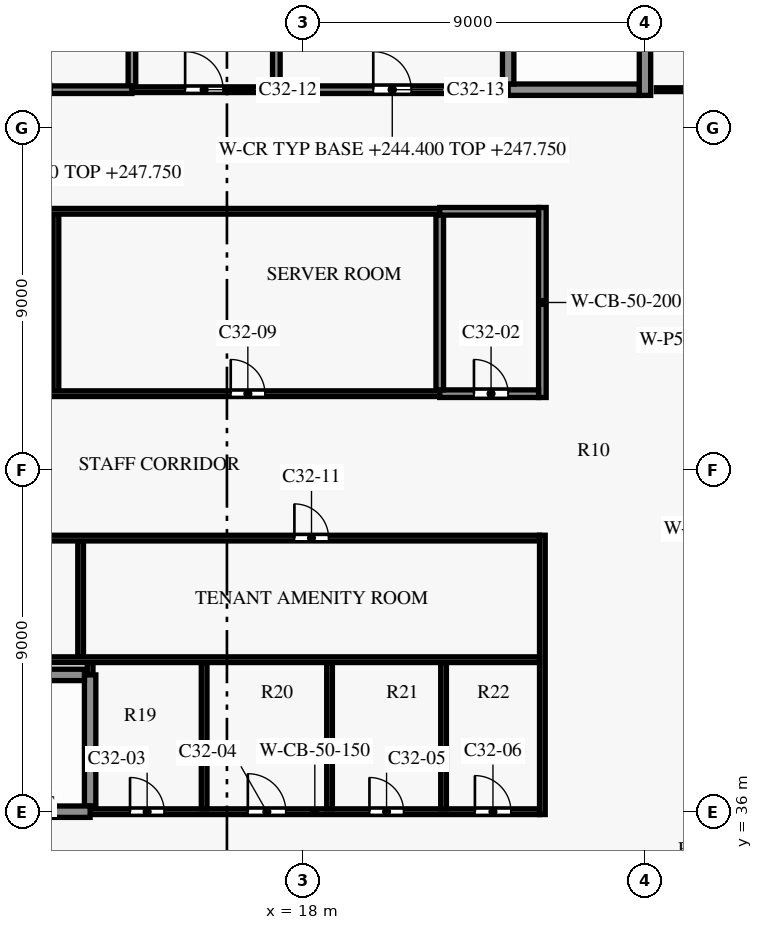
"""IFC4 building model, lengths in metres.
Left out: names, types, materials, properties, quantities, classifications, styles, units other than length and angle.
Written with IfcOpenShell. Run it as: python <this file> out.ifc"""

import sys

from ifc_helpers import new_model, si_unit, direction, frame, frame_2d, origin, place, context, subcontext, project, spatial, rectangle, extrude, element, fill, save


model = new_model("IFC4")
c1 = context("Model", 3, precision=1e-05, world=origin(), true_north=direction((0.0, 1.0)))
c2 = subcontext(c1, "Body", "Model", "MODEL_VIEW")
j1 = project(units=[si_unit("LENGTHUNIT", "METRE"), si_unit("PLANEANGLEUNIT", "RADIAN")], contexts=[c1])
p1 = place(None, origin())
s1 = spatial("IfcSite", under=j1, at=p1, CompositionType="ELEMENT")
p2 = place(p1, origin())
s2 = spatial("IfcBuilding", under=s1, at=p2, CompositionType="ELEMENT")
p3 = place(p2, frame((0.0, 0.0, 244.4)))
s3 = spatial("IfcBuildingStorey", under=s2, at=p3, CompositionType="ELEMENT", Elevation=244.4)
p4 = place(p3, frame((12.4, 36.0, 0.0), z_axis=(0.0, 0.0, 1.0), x_axis=(1.0, 0.0, 0.0)))
e1 = element("IfcWall", 1, at=p4, inside=s3, PredefinedType="SHEAR", context=c2, shape_type="SweptSolid", body=[
    extrude(rectangle(XDim=11.825, YDim=0.15, at=frame_2d((5.913, 0.0))), origin(), (0.0, 0.0, 1.0), 3.5),
])
p5 = place(p4, frame((1.05, 0.0, 0.0)))
e2 = element("IfcOpeningElement", 2, at=p5, cuts=e1, PredefinedType="OPENING", context=c2, shape_type="SweptSolid", body=[
    extrude(rectangle(XDim=0.9, YDim=2.1, at=frame_2d((0.45, 1.05))), frame((0.0, 0.085, 0.0), z_axis=(0.0, -1.0, 0.0), x_axis=(1.0, 0.0, 0.0)), (0.0, 0.0, 1.0), 0.17),
])
p6 = place(p4, frame((4.15, 0.0, 0.0)))
e3 = element("IfcOpeningElement", 3, at=p6, cuts=e1, PredefinedType="OPENING", context=c2, shape_type="SweptSolid", body=[
    extrude(rectangle(XDim=1.0, YDim=2.1, at=frame_2d((0.5, 1.05))), frame((0.0, 0.085, 0.0), z_axis=(0.0, -1.0, 0.0), x_axis=(1.0, 0.0, 0.0)), (0.0, 0.0, 1.0), 0.17),
])
p7 = place(p4, frame((7.35, 0.0, 0.0)))
e4 = element("IfcOpeningElement", 4, at=p7, cuts=e1, PredefinedType="OPENING", context=c2, shape_type="SweptSolid", body=[
    extrude(rectangle(XDim=0.9, YDim=2.1, at=frame_2d((0.45, 1.05))), frame((0.0, 0.085, 0.0), z_axis=(0.0, -1.0, 0.0), x_axis=(1.0, 0.0, 0.0)), (0.0, 0.0, 1.0), 0.17),
])
p8 = place(p4, frame((10.125, 0.0, 0.0)))
e5 = element("IfcOpeningElement", 5, at=p8, cuts=e1, PredefinedType="OPENING", context=c2, shape_type="SweptSolid", body=[
    extrude(rectangle(XDim=0.95, YDim=2.1, at=frame_2d((0.475, 1.05))), frame((0.0, 0.085, 0.0), z_axis=(0.0, -1.0, 0.0), x_axis=(1.0, 0.0, 0.0)), (0.0, 0.0, 1.0), 0.17),
])
p9 = place(p3, frame((4.4, 36.0, 0.0), z_axis=(0.0, 0.0, 1.0), x_axis=(1.0, 0.0, 0.0)))
e6 = element("IfcWall", 6, at=p9, inside=s3, PredefinedType="SHEAR", context=c2, shape_type="SweptSolid", body=[
    extrude(rectangle(XDim=8.0, YDim=0.3, at=frame_2d((4.0, 0.0))), origin(), (0.0, 0.0, 1.0), 3.5),
])
p10 = place(p9, frame((0.3, 0.0, 0.0)))
e7 = element("IfcOpeningElement", 7, at=p10, cuts=e6, PredefinedType="OPENING", context=c2, shape_type="SweptSolid", body=[
    extrude(rectangle(XDim=1.5, YDim=2.2, at=frame_2d((0.75, 1.1))), frame((0.0, 0.16, 0.0), z_axis=(0.0, -1.0, 0.0), x_axis=(1.0, 0.0, 0.0)), (0.0, 0.0, 1.0), 0.32),
])
p11 = place(p3, frame((4.55, 39.6, 0.0), z_axis=(0.0, 0.0, 1.0), x_axis=(1.0, 0.0, 0.0)))
e8 = element("IfcWall", 8, at=p11, inside=s3, PredefinedType="SHEAR", context=c2, shape_type="SweptSolid", body=[
    extrude(rectangle(XDim=7.7, YDim=0.3, at=frame_2d((3.85, 0.0))), origin(), (0.0, 0.0, 1.0), 3.5),
])
p12 = place(p3, frame((8.1, 40.0, 0.0), z_axis=(0.0, 0.0, 1.0), x_axis=(1.0, 0.0, 0.0)))
e9 = element("IfcWall", 9, at=p12, inside=s3, PredefinedType="PARTITIONING", context=c2, shape_type="SweptSolid", body=[
    extrude(rectangle(XDim=16.125, YDim=0.15, at=frame_2d((8.062, 0.0))), origin(), (0.0, 0.0, 1.0), 3.35),
])
p13 = place(p3, frame((8.1, 43.2, 0.0), z_axis=(0.0, 0.0, 1.0), x_axis=(1.0, 0.0, 0.0)))
e10 = element("IfcWall", 10, at=p13, inside=s3, PredefinedType="PARTITIONING", context=c2, shape_type="SweptSolid", body=[
    extrude(rectangle(XDim=16.125, YDim=0.15, at=frame_2d((8.062, 0.0))), origin(), (0.0, 0.0, 1.0), 3.35),
])
p14 = place(p13, frame((1.575, 0.0, 0.0)))
e11 = element("IfcOpeningElement", 11, at=p14, cuts=e10, PredefinedType="OPENING", context=c2, shape_type="SweptSolid", body=[
    extrude(rectangle(XDim=0.9, YDim=2.1, at=frame_2d((0.45, 1.05))), frame((0.0, 0.085, 0.0), z_axis=(0.0, -1.0, 0.0), x_axis=(1.0, 0.0, 0.0)), (0.0, 0.0, 1.0), 0.17),
])
p15 = place(p13, frame((9.675, 0.0, 0.0)))
e12 = element("IfcOpeningElement", 12, at=p15, cuts=e10, PredefinedType="OPENING", context=c2, shape_type="SweptSolid", body=[
    extrude(rectangle(XDim=0.9, YDim=2.1, at=frame_2d((0.45, 1.05))), frame((0.0, 0.085, 0.0), z_axis=(0.0, -1.0, 0.0), x_axis=(1.0, 0.0, 0.0)), (0.0, 0.0, 1.0), 0.17),
])
p16 = place(p3, frame((8.1, 47.0, 0.0), z_axis=(0.0, 0.0, 1.0), x_axis=(1.0, 0.0, 0.0)))
e13 = element("IfcWall", 13, at=p16, inside=s3, PredefinedType="PARTITIONING", context=c2, shape_type="SweptSolid", body=[
    extrude(rectangle(XDim=13.5, YDim=0.15, at=frame_2d((6.75, 0.0))), origin(), (0.0, 0.0, 1.0), 3.35),
])
p17 = place(p16, frame((1.25, 0.0, 0.0)))
e14 = element("IfcOpeningElement", 14, at=p17, cuts=e13, PredefinedType="OPENING", context=c2, shape_type="SweptSolid", body=[
    extrude(rectangle(XDim=0.9, YDim=2.1, at=frame_2d((0.45, 1.05))), frame((0.0, 0.085, 0.0), z_axis=(0.0, -1.0, 0.0), x_axis=(1.0, 0.0, 0.0)), (0.0, 0.0, 1.0), 0.17),
])
p18 = place(p16, frame((8.0, 0.0, 0.0)))
e15 = element("IfcOpeningElement", 15, at=p18, cuts=e13, PredefinedType="OPENING", context=c2, shape_type="SweptSolid", body=[
    extrude(rectangle(XDim=0.9, YDim=2.1, at=frame_2d((0.45, 1.05))), frame((0.0, 0.085, 0.0), z_axis=(0.0, -1.0, 0.0), x_axis=(1.0, 0.0, 0.0)), (0.0, 0.0, 1.0), 0.17),
])
p19 = place(p3, frame((21.6, 47.0, 0.0), z_axis=(0.0, 0.0, 1.0), x_axis=(1.0, 0.0, 0.0)))
e16 = element("IfcWall", 16, at=p19, inside=s3, PredefinedType="PARTITIONING", context=c2, shape_type="SweptSolid", body=[
    extrude(rectangle(XDim=2.6, YDim=0.2, at=frame_2d((1.3, 0.0))), origin(), (0.0, 0.0, 1.0), 3.35),
])
p20 = place(p19, frame((0.9, 0.0, 0.0)))
e17 = element("IfcOpeningElement", 17, at=p20, cuts=e16, PredefinedType="OPENING", context=c2, shape_type="SweptSolid", body=[
    extrude(rectangle(XDim=0.9, YDim=2.1, at=frame_2d((0.45, 1.05))), frame((0.0, 0.11, 0.0), z_axis=(0.0, -1.0, 0.0), x_axis=(1.0, 0.0, 0.0)), (0.0, 0.0, 1.0), 0.22),
])
p21 = place(p3, frame((8.225, 51.8, 0.0), z_axis=(0.0, 0.0, 1.0), x_axis=(1.0, 0.0, 0.0)))
e18 = element("IfcWall", 18, at=p21, inside=s3, PredefinedType="PARTITIONING", context=c2, shape_type="SweptSolid", body=[
    extrude(rectangle(XDim=13.375, YDim=0.15, at=frame_2d((6.688, 0.0))), origin(), (0.0, 0.0, 1.0), 3.35),
])
p22 = place(p3, frame((21.6, 51.8, 0.0), z_axis=(0.0, 0.0, 1.0), x_axis=(1.0, 0.0, 0.0)))
e19 = element("IfcWall", 19, at=p22, inside=s3, PredefinedType="PARTITIONING", context=c2, shape_type="SweptSolid", body=[
    extrude(rectangle(XDim=2.6, YDim=0.2, at=frame_2d((1.3, 0.0))), origin(), (0.0, 0.0, 1.0), 3.35),
])
p23 = place(p3, frame((8.1, 55.0, 0.0), z_axis=(0.0, 0.0, 1.0), x_axis=(1.0, 0.0, 0.0)))
e20 = element("IfcWall", 20, at=p23, inside=s3, PredefinedType="PARTITIONING", context=c2, shape_type="SweptSolid", body=[
    extrude(rectangle(XDim=5.4, YDim=0.2, at=frame_2d((2.7, 0.0))), origin(), (0.0, 0.0, 1.0), 3.35),
])
p24 = place(p23, frame((2.1, 0.0, 0.0)))
e21 = element("IfcOpeningElement", 21, at=p24, cuts=e20, PredefinedType="OPENING", context=c2, shape_type="SweptSolid", body=[
    extrude(rectangle(XDim=1.2, YDim=2.2, at=frame_2d((0.6, 1.1))), frame((0.0, 0.11, 0.0), z_axis=(0.0, -1.0, 0.0), x_axis=(1.0, 0.0, 0.0)), (0.0, 0.0, 1.0), 0.22),
])
p25 = place(p3, frame((13.5, 55.0, 0.0), z_axis=(0.0, 0.0, 1.0), x_axis=(1.0, 0.0, 0.0)))
e22 = element("IfcWall", 22, at=p25, inside=s3, PredefinedType="PARTITIONING", context=c2, shape_type="SweptSolid", body=[
    extrude(rectangle(XDim=3.8, YDim=0.15, at=frame_2d((1.9, 0.0))), origin(), (0.0, 0.0, 1.0), 3.35),
])
p26 = place(p25, frame((1.4, 0.0, 0.0)))
e23 = element("IfcOpeningElement", 23, at=p26, cuts=e22, PredefinedType="OPENING", context=c2, shape_type="SweptSolid", body=[
    extrude(rectangle(XDim=1.0, YDim=2.1, at=frame_2d((0.5, 1.05))), frame((0.0, 0.085, 0.0), z_axis=(0.0, -1.0, 0.0), x_axis=(1.0, 0.0, 0.0)), (0.0, 0.0, 1.0), 0.17),
])
p27 = place(p3, frame((17.3, 55.0, 0.0), z_axis=(0.0, 0.0, 1.0), x_axis=(1.0, 0.0, 0.0)))
e24 = element("IfcWall", 24, at=p27, inside=s3, PredefinedType="PARTITIONING", context=c2, shape_type="SweptSolid", body=[
    extrude(rectangle(XDim=6.1, YDim=0.2, at=frame_2d((3.05, 0.0))), origin(), (0.0, 0.0, 1.0), 3.35),
])
p28 = place(p27, frame((2.55, 0.0, 0.0)))
e25 = element("IfcOpeningElement", 25, at=p28, cuts=e24, PredefinedType="OPENING", context=c2, shape_type="SweptSolid", body=[
    extrude(rectangle(XDim=1.0, YDim=2.1, at=frame_2d((0.5, 1.05))), frame((0.0, 0.11, 0.0), z_axis=(0.0, -1.0, 0.0), x_axis=(1.0, 0.0, 0.0)), (0.0, 0.0, 1.0), 0.22),
])
p29 = place(p3, frame((23.4, 55.0, 0.0), z_axis=(0.0, 0.0, 1.0), x_axis=(1.0, 0.0, 0.0)))
e26 = element("IfcWall", 26, at=p29, inside=s3, PredefinedType="SHEAR", context=c2, shape_type="SweptSolid", body=[
    extrude(rectangle(XDim=3.45, YDim=0.3, at=frame_2d((1.725, 0.0))), origin(), (0.0, 0.0, 1.0), 3.5),
])
p30 = place(p3, frame((11.5, 47.075, 0.0), z_axis=(0.0, 0.0, 1.0), x_axis=(0.0, 1.0, 0.0)))
e27 = element("IfcWall", 27, at=p30, inside=s3, PredefinedType="PARTITIONING", context=c2, shape_type="SweptSolid", body=[
    extrude(rectangle(XDim=4.65, YDim=0.15, at=frame_2d((2.325, 0.0))), origin(), (0.0, 0.0, 1.0), 3.35),
])
p31 = place(p3, frame((12.15, 40.075, 0.0), z_axis=(0.0, 0.0, 1.0), x_axis=(0.0, 1.0, 0.0)))
e28 = element("IfcWall", 28, at=p31, inside=s3, PredefinedType="PARTITIONING", context=c2, shape_type="SweptSolid", body=[
    extrude(rectangle(XDim=3.05, YDim=0.15, at=frame_2d((1.525, 0.0))), origin(), (0.0, 0.0, 1.0), 3.35),
])
p32 = place(p3, frame((12.4, 39.6, 0.0), z_axis=(0.0, 0.0, 1.0), x_axis=(0.0, 1.0, 0.0)))
e29 = element("IfcWall", 29, at=p32, inside=s3, PredefinedType="PARTITIONING", context=c2, shape_type="SweptSolid", body=[
    extrude(rectangle(XDim=0.325, YDim=0.15, at=frame_2d((0.163, 0.0))), origin(), (0.0, 0.0, 1.0), 3.35),
])
p33 = place(p3, frame((12.4, 36.15, 0.0), z_axis=(0.0, 0.0, 1.0), x_axis=(0.0, 1.0, 0.0)))
e30 = element("IfcWall", 30, at=p33, inside=s3, PredefinedType="SHEAR", context=c2, shape_type="SweptSolid", body=[
    extrude(rectangle(XDim=3.45, YDim=0.3, at=frame_2d((1.725, 0.0))), origin(), (0.0, 0.0, 1.0), 3.5),
])
p34 = place(p3, frame((13.5, 55.1, 0.0), z_axis=(0.0, 0.0, 1.0), x_axis=(0.0, 1.0, 0.0)))
e31 = element("IfcWall", 31, at=p34, inside=s3, PredefinedType="PARTITIONING", context=c2, shape_type="SweptSolid", body=[
    extrude(rectangle(XDim=3.9, YDim=0.2, at=frame_2d((1.95, 0.0))), origin(), (0.0, 0.0, 1.0), 3.35),
])
p35 = place(p3, frame((15.4, 36.075, 0.0), z_axis=(0.0, 0.0, 1.0), x_axis=(0.0, 1.0, 0.0)))
e32 = element("IfcWall", 32, at=p35, inside=s3, PredefinedType="PARTITIONING", context=c2, shape_type="SweptSolid", body=[
    extrude(rectangle(XDim=3.85, YDim=0.15, at=frame_2d((1.925, 0.0))), origin(), (0.0, 0.0, 1.0), 3.35),
])
p36 = place(p3, frame((17.3, 55.1, 0.0), z_axis=(0.0, 0.0, 1.0), x_axis=(0.0, 1.0, 0.0)))
e33 = element("IfcWall", 33, at=p36, inside=s3, PredefinedType="PARTITIONING", context=c2, shape_type="SweptSolid", body=[
    extrude(rectangle(XDim=7.05, YDim=0.2, at=frame_2d((3.525, 0.0))), origin(), (0.0, 0.0, 1.0), 3.35),
])
p37 = place(p3, frame((18.7, 36.075, 0.0), z_axis=(0.0, 0.0, 1.0), x_axis=(0.0, 1.0, 0.0)))
e34 = element("IfcWall", 34, at=p37, inside=s3, PredefinedType="PARTITIONING", context=c2, shape_type="SweptSolid", body=[
    extrude(rectangle(XDim=3.85, YDim=0.15, at=frame_2d((1.925, 0.0))), origin(), (0.0, 0.0, 1.0), 3.35),
])
p38 = place(p3, frame((21.6, 47.1, 0.0), z_axis=(0.0, 0.0, 1.0), x_axis=(0.0, 1.0, 0.0)))
e35 = element("IfcWall", 35, at=p38, inside=s3, PredefinedType="PARTITIONING", context=c2, shape_type="SweptSolid", body=[
    extrude(rectangle(XDim=4.6, YDim=0.2, at=frame_2d((2.3, 0.0))), origin(), (0.0, 0.0, 1.0), 3.35),
])
p39 = place(p3, frame((21.7, 36.075, 0.0), z_axis=(0.0, 0.0, 1.0), x_axis=(0.0, 1.0, 0.0)))
e36 = element("IfcWall", 36, at=p39, inside=s3, PredefinedType="PARTITIONING", context=c2, shape_type="SweptSolid", body=[
    extrude(rectangle(XDim=3.85, YDim=0.15, at=frame_2d((1.925, 0.0))), origin(), (0.0, 0.0, 1.0), 3.35),
])
p40 = place(p3, frame((23.4, 55.15, 0.0), z_axis=(0.0, 0.0, 1.0), x_axis=(0.0, 1.0, 0.0)))
e37 = element("IfcWall", 37, at=p40, inside=s3, PredefinedType="SHEAR", context=c2, shape_type="SweptSolid", body=[
    extrude(rectangle(XDim=8.0, YDim=0.3, at=frame_2d((4.0, 0.0))), origin(), (0.0, 0.0, 1.0), 3.5),
])
p41 = place(p3, frame((24.3, 35.925, 0.0), z_axis=(0.0, 0.0, 1.0), x_axis=(0.0, 1.0, 0.0)))
e38 = element("IfcWall", 38, at=p41, inside=s3, PredefinedType="PARTITIONING", context=c2, shape_type="SweptSolid", body=[
    extrude(rectangle(XDim=7.35, YDim=0.15, at=frame_2d((3.675, 0.0))), origin(), (0.0, 0.0, 1.0), 3.35),
])
p42 = place(p3, frame((24.3, 46.9, 0.0), z_axis=(0.0, 0.0, 1.0), x_axis=(0.0, 1.0, 0.0)))
e39 = element("IfcWall", 39, at=p42, inside=s3, PredefinedType="SHEAR", context=c2, shape_type="SweptSolid", body=[
    extrude(rectangle(XDim=5.0, YDim=0.2, at=frame_2d((2.5, 0.0))), origin(), (0.0, 0.0, 1.0), 3.5),
])
p43 = place(p3, frame((27.0, 54.85, 0.0), z_axis=(0.0, 0.0, 1.0), x_axis=(0.0, 1.0, 0.0)))
e40 = element("IfcWall", 40, at=p43, inside=s3, PredefinedType="SHEAR", context=c2, shape_type="SweptSolid", body=[
    extrude(rectangle(XDim=8.55, YDim=0.3, at=frame_2d((4.275, 0.0))), origin(), (0.0, 0.0, 1.0), 3.5),
])
p44 = place(p43, frame((6.55, 0.0, 0.0)))
e41 = element("IfcOpeningElement", 41, at=p44, cuts=e40, PredefinedType="OPENING", context=c2, shape_type="SweptSolid", body=[
    extrude(rectangle(XDim=1.2, YDim=2.2, at=frame_2d((0.6, 1.1))), frame((0.0, 0.16, 0.0), z_axis=(0.0, -1.0, 0.0), x_axis=(1.0, 0.0, 0.0)), (0.0, 0.0, 1.0), 0.32),
])
p45 = place(p3, frame((27.3, 55.0, 0.0), z_axis=(0.0, 0.0, 1.0), x_axis=(1.0, 0.0, 0.0)))
e42 = element("IfcWall", 42, at=p45, inside=s3, PredefinedType="PARTITIONING", context=c2, shape_type="SweptSolid", body=[
    extrude(rectangle(XDim=2.75, YDim=0.1, at=frame_2d((1.375, 0.0))), origin(), (0.0, 0.0, 1.0), 3.33),
])
p46 = place(p24, origin())
e43 = element("IfcDoor", 43, at=p46, inside=s3, OperationType="SINGLE_SWING_RIGHT", PredefinedType="DOOR", context=c2, shape_type="SweptSolid", body=[
    extrude(rectangle(XDim=1.2, YDim=2.2, at=frame_2d((0.6, 1.1))), frame((0.0, 0.025, 0.0), z_axis=(0.0, -1.0, 0.0), x_axis=(1.0, 0.0, 0.0)), (0.0, 0.0, 1.0), 0.05),
])
fill(e21, e43)
p47 = place(p20, origin())
e44 = element("IfcDoor", 44, at=p47, inside=s3, OperationType="SINGLE_SWING_LEFT", PredefinedType="DOOR", context=c2, shape_type="SweptSolid", body=[
    extrude(rectangle(XDim=0.9, YDim=2.1, at=frame_2d((0.45, 1.05))), frame((0.0, 0.025, 0.0), z_axis=(0.0, -1.0, 0.0), x_axis=(1.0, 0.0, 0.0)), (0.0, 0.0, 1.0), 0.05),
])
fill(e17, e44)
p48 = place(p5, origin())
e45 = element("IfcDoor", 45, at=p48, inside=s3, OperationType="SINGLE_SWING_RIGHT", PredefinedType="DOOR", context=c2, shape_type="SweptSolid", body=[
    extrude(rectangle(XDim=0.9, YDim=2.1, at=frame_2d((0.45, 1.05))), frame((0.0, 0.025, 0.0), z_axis=(0.0, -1.0, 0.0), x_axis=(1.0, 0.0, 0.0)), (0.0, 0.0, 1.0), 0.05),
])
fill(e2, e45)
p49 = place(p6, origin())
e46 = element("IfcDoor", 46, at=p49, inside=s3, OperationType="SINGLE_SWING_LEFT", PredefinedType="DOOR", context=c2, shape_type="SweptSolid", body=[
    extrude(rectangle(XDim=1.0, YDim=2.1, at=frame_2d((0.5, 1.05))), frame((0.0, 0.025, 0.0), z_axis=(0.0, -1.0, 0.0), x_axis=(1.0, 0.0, 0.0)), (0.0, 0.0, 1.0), 0.05),
])
fill(e3, e46)
p50 = place(p7, origin())
e47 = element("IfcDoor", 47, at=p50, inside=s3, OperationType="SINGLE_SWING_RIGHT", PredefinedType="DOOR", context=c2, shape_type="SweptSolid", body=[
    extrude(rectangle(XDim=0.9, YDim=2.1, at=frame_2d((0.45, 1.05))), frame((0.0, 0.025, 0.0), z_axis=(0.0, -1.0, 0.0), x_axis=(1.0, 0.0, 0.0)), (0.0, 0.0, 1.0), 0.05),
])
fill(e4, e47)
p51 = place(p8, origin())
e48 = element("IfcDoor", 48, at=p51, inside=s3, OperationType="SINGLE_SWING_LEFT", PredefinedType="DOOR", context=c2, shape_type="SweptSolid", body=[
    extrude(rectangle(XDim=0.95, YDim=2.1, at=frame_2d((0.475, 1.05))), frame((0.0, 0.025, 0.0), z_axis=(0.0, -1.0, 0.0), x_axis=(1.0, 0.0, 0.0)), (0.0, 0.0, 1.0), 0.05),
])
fill(e5, e48)
p52 = place(p18, origin())
e49 = element("IfcDoor", 49, at=p52, inside=s3, OperationType="SINGLE_SWING_RIGHT", PredefinedType="DOOR", context=c2, shape_type="SweptSolid", body=[
    extrude(rectangle(XDim=0.9, YDim=2.1, at=frame_2d((0.45, 1.05))), frame((0.0, 0.025, 0.0), z_axis=(0.0, -1.0, 0.0), x_axis=(1.0, 0.0, 0.0)), (0.0, 0.0, 1.0), 0.05),
])
fill(e15, e49)
p53 = place(p15, origin())
e50 = element("IfcDoor", 50, at=p53, inside=s3, OperationType="SINGLE_SWING_LEFT", PredefinedType="DOOR", context=c2, shape_type="SweptSolid", body=[
    extrude(rectangle(XDim=0.9, YDim=2.1, at=frame_2d((0.45, 1.05))), frame((0.0, 0.025, 0.0), z_axis=(0.0, -1.0, 0.0), x_axis=(1.0, 0.0, 0.0)), (0.0, 0.0, 1.0), 0.05),
])
fill(e12, e50)
p54 = place(p26, origin())
e51 = element("IfcDoor", 51, at=p54, inside=s3, OperationType="SINGLE_SWING_LEFT", PredefinedType="DOOR", context=c2, shape_type="SweptSolid", body=[
    extrude(rectangle(XDim=1.0, YDim=2.1, at=frame_2d((0.5, 1.05))), frame((0.0, 0.025, 0.0), z_axis=(0.0, -1.0, 0.0), x_axis=(1.0, 0.0, 0.0)), (0.0, 0.0, 1.0), 0.05),
])
fill(e23, e51)
p55 = place(p28, origin())
e52 = element("IfcDoor", 52, at=p55, inside=s3, OperationType="SINGLE_SWING_RIGHT", PredefinedType="DOOR", context=c2, shape_type="SweptSolid", body=[
    extrude(rectangle(XDim=1.0, YDim=2.1, at=frame_2d((0.5, 1.05))), frame((0.0, 0.025, 0.0), z_axis=(0.0, -1.0, 0.0), x_axis=(1.0, 0.0, 0.0)), (0.0, 0.0, 1.0), 0.05),
])
fill(e25, e52)
save(model, sys.argv[1])
